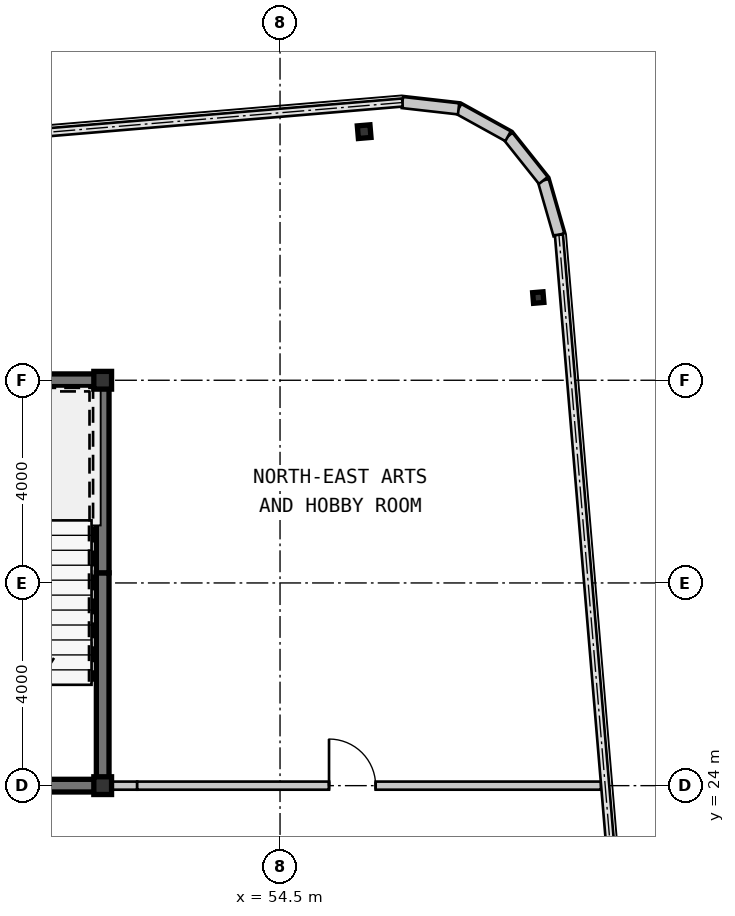
"""IFC4 building model, lengths in metres.
Left out: names, types, materials, properties, quantities, classifications, styles, units other than length and angle.
Written with IfcOpenShell. Run it as: python <this file> out.ifc"""

import sys

from ifc_helpers import new_model, si_unit, direction, frame, frame_2d, origin, origin_2d, place, context, subcontext, project, spatial, rectangle, hollow_rectangle, i_section, extrude, source, transform, mapped, element, fill, save


model = new_model("IFC4")
c1 = context("Model", 3, precision=1e-05, world=origin(), true_north=direction((0.0, 1.0)))
c2 = subcontext(c1, "Body", "Model", "MODEL_VIEW")
j1 = project(units=[si_unit("LENGTHUNIT", "METRE"), si_unit("PLANEANGLEUNIT", "RADIAN")], contexts=[c1])
p1 = place(None, origin())
s1 = spatial("IfcSite", under=j1, at=p1, CompositionType="ELEMENT")
p2 = place(p1, origin())
s2 = spatial("IfcBuilding", under=s1, at=p2, CompositionType="ELEMENT")
p3 = place(p2, frame((0.0, 0.0, 197.75)))
s3 = spatial("IfcBuildingStorey", under=s2, at=p3, CompositionType="ELEMENT", Elevation=197.75)
m1 = source(origin(), c2, "Body", "SweptSolid", [
    extrude(hollow_rectangle(XDim=0.35, YDim=0.35, WallThickness=0.016, at=origin_2d()), origin(), (0.0, 0.0, 1.0), 3.15),
])
for number, where, z_axis, x_axis in (
    (1, (51.0, 24.0, 0.0), (0.0, 0.0, 1.0), (1.0, 0.0, 0.0)),
    (2, (51.0, 32.0, 0.0), (0.0, 0.0, 1.0), (1.0, 0.0, 0.0)),
):
    element("IfcColumn", number, at=place(p3, frame(where, z_axis=z_axis, x_axis=x_axis)), inside=s3, PredefinedType="COLUMN", context=c2, shape_type="MappedRepresentation", body=[
        mapped(m1, transform((0.0, 0.0, 0.0), scale=1.0)),
    ])
m2 = source(origin(), c2, "Body", "SweptSolid", [
    extrude(hollow_rectangle(XDim=0.25, YDim=0.25, WallThickness=0.01, at=origin_2d()), origin(), (0.0, 0.0, 1.0), 3.15),
])
p4 = place(p3, frame((56.16, 36.906, 0.0), z_axis=(0.0, 0.0, 1.0), x_axis=(0.99649285925, 0.083677843332, 0.0)))
e3 = element("IfcColumn", 3, at=p4, inside=s3, PredefinedType="COLUMN", context=c2, shape_type="MappedRepresentation", body=[
    mapped(m2, transform((0.0, 0.0, 0.0), scale=1.0)),
])
m3 = source(origin(), c2, "Body", "SweptSolid", [
    extrude(i_section(OverallWidth=0.205, OverallDepth=0.21, WebThickness=0.009, FlangeThickness=0.014, at=origin_2d()), origin(), (0.0, 0.0, 1.0), 3.15),
])
p5 = place(p3, frame((59.596, 33.632, 0.0), z_axis=(0.0, 0.0, 1.0), x_axis=(0.99649285925, 0.083677843332, 0.0)))
e4 = element("IfcColumn", 4, at=p5, inside=s3, PredefinedType="COLUMN", context=c2, shape_type="MappedRepresentation", body=[
    mapped(m3, transform((0.0, 0.0, 0.0), scale=1.0)),
])
m4 = source(origin(), c2, "Body", "SweptSolid", [
    extrude(rectangle(XDim=1.116, YDim=0.22, at=frame_2d((0.558, 0.0))), origin(), (0.0, 0.0, 1.0), 2.93),
])
for number, where, z_axis, x_axis in (
    (5, (60.004, 34.87, 0.0), (0.0, 0.0, 1.0), (-0.277, 0.961, 0.0)),
    (6, (59.696, 35.943, 0.0), (0.0, 0.0, 1.0), (-0.623, 0.782, 0.0)),
    (7, (59.0, 36.816, 0.0), (0.0, 0.0, 1.0), (-0.875, 0.484, 0.0)),
    (8, (58.024, 37.356, 0.0), (0.0, 0.0, 1.0), (-0.994, 0.112, 0.0)),
):
    element("IfcWall", number, at=place(p3, frame(where, z_axis=z_axis, x_axis=x_axis)), inside=s3, PredefinedType="SOLIDWALL", context=c2, shape_type="MappedRepresentation", body=[
        mapped(m4, transform((0.0, 0.0, 0.0), scale=1.0)),
    ])
m5 = source(origin(), c2, "Body", "SweptSolid", [
    extrude(rectangle(XDim=11.925, YDim=0.25, at=frame_2d((5.962, 0.0))), origin(), (0.0, 0.0, 1.0), 2.93),
])
p6 = place(p3, frame((39.2, 32.0, 0.0), z_axis=(0.0, 0.0, 1.0), x_axis=(1.0, 0.0, 0.0)))
e9 = element("IfcWall", 9, at=p6, inside=s3, PredefinedType="SHEAR", context=c2, shape_type="MappedRepresentation", body=[
    mapped(m5, transform((0.0, 0.0, 0.0), scale=1.0)),
])
m6 = source(origin(), c2, "Body", "SweptSolid", [
    extrude(rectangle(XDim=4.075, YDim=0.25, at=frame_2d((2.038, 0.0))), origin(), (0.0, 0.0, 1.0), 2.93),
])
p7 = place(p3, frame((51.0, 24.125, 0.0), z_axis=(0.0, 0.0, 1.0), x_axis=(0.0, 1.0, 0.0)))
e10 = element("IfcWall", 10, at=p7, inside=s3, PredefinedType="SHEAR", context=c2, shape_type="MappedRepresentation", body=[
    mapped(m6, transform((0.0, 0.0, 0.0), scale=1.0)),
])
m7 = source(origin(), c2, "Body", "SweptSolid", [
    extrude(rectangle(XDim=3.675, YDim=0.25, at=frame_2d((1.837, 0.0))), origin(), (0.0, 0.0, 1.0), 2.93),
])
p8 = place(p3, frame((51.0, 28.2, 0.0), z_axis=(0.0, 0.0, 1.0), x_axis=(0.0, 1.0, 0.0)))
e11 = element("IfcWall", 11, at=p8, inside=s3, PredefinedType="SHEAR", context=c2, shape_type="MappedRepresentation", body=[
    mapped(m7, transform((0.0, 0.0, 0.0), scale=1.0)),
])
m8 = source(origin(), c2, "Body", "SweptSolid", [
    extrude(rectangle(XDim=4.85, YDim=0.25, at=frame_2d((2.425, 0.0))), origin(), (0.0, 0.0, 1.0), 2.93),
])
p9 = place(p3, frame((46.275, 24.0, 0.0), z_axis=(0.0, 0.0, 1.0), x_axis=(1.0, 0.0, 0.0)))
e12 = element("IfcWall", 12, at=p9, inside=s3, PredefinedType="SHEAR", context=c2, shape_type="MappedRepresentation", body=[
    mapped(m8, transform((0.0, 0.0, 0.0), scale=1.0)),
])
m9 = source(origin(), c2, "Body", "SweptSolid", [
    extrude(rectangle(XDim=0.556, YDim=0.16, at=frame_2d((0.278, 0.0))), origin(), (0.0, 0.0, 1.0), 2.47),
])
p10 = place(p3, frame((51.125, 24.0, 0.0), z_axis=(0.0, 0.0, 1.0), x_axis=(1.0, 0.0, 0.0)))
e13 = element("IfcWall", 13, at=p10, inside=s3, PredefinedType="PARTITIONING", context=c2, shape_type="MappedRepresentation", body=[
    mapped(m9, transform((0.0, 0.0, 0.0), scale=1.0)),
])
m10 = source(origin(), c2, "Body", "SweptSolid", [
    extrude(rectangle(XDim=9.153, YDim=0.16, at=frame_2d((4.576, 0.0))), origin(), (0.0, 0.0, 1.0), 2.93),
])
p11 = place(p3, frame((51.681, 24.0, 0.0), z_axis=(0.0, 0.0, 1.0), x_axis=(1.0, 0.0, 0.0)))
e14 = element("IfcWall", 14, at=p11, inside=s3, PredefinedType="PARTITIONING", context=c2, shape_type="MappedRepresentation", body=[
    mapped(m10, transform((0.0, 0.0, 0.0), scale=1.0)),
])
m11 = source(origin(), c2, "Body", "SweptSolid", [
    extrude(rectangle(XDim=0.92, YDim=2.1, at=frame_2d((0.46, 1.05))), frame((0.0, 0.09, 0.0), z_axis=(0.0, -1.0, 0.0), x_axis=(1.0, 0.0, 0.0)), (0.0, 0.0, 1.0), 0.18),
])
p12 = place(p11, frame((3.786, 0.0, 0.0)))
e15 = element("IfcOpeningElement", 15, at=p12, cuts=e14, PredefinedType="OPENING", context=c2, shape_type="MappedRepresentation", body=[
    mapped(m11, transform((0.0, 0.0, 0.0), scale=1.0)),
])
m12 = source(origin(), c2, "Body", "SweptSolid", [
    extrude(rectangle(XDim=0.92, YDim=2.1, at=frame_2d((0.46, 1.05))), frame((0.0, 0.025, 0.0), z_axis=(0.0, -1.0, 0.0), x_axis=(1.0, 0.0, 0.0)), (0.0, 0.0, 1.0), 0.05),
])
p13 = place(p12, origin())
e16 = element("IfcDoor", 16, at=p13, inside=s3, OperationType="SINGLE_SWING_LEFT", PredefinedType="DOOR", context=c2, shape_type="MappedRepresentation", body=[
    mapped(m12, transform((0.0, 0.0, 0.0), scale=1.0)),
])
fill(e15, e16)
save(model, sys.argv[1])
